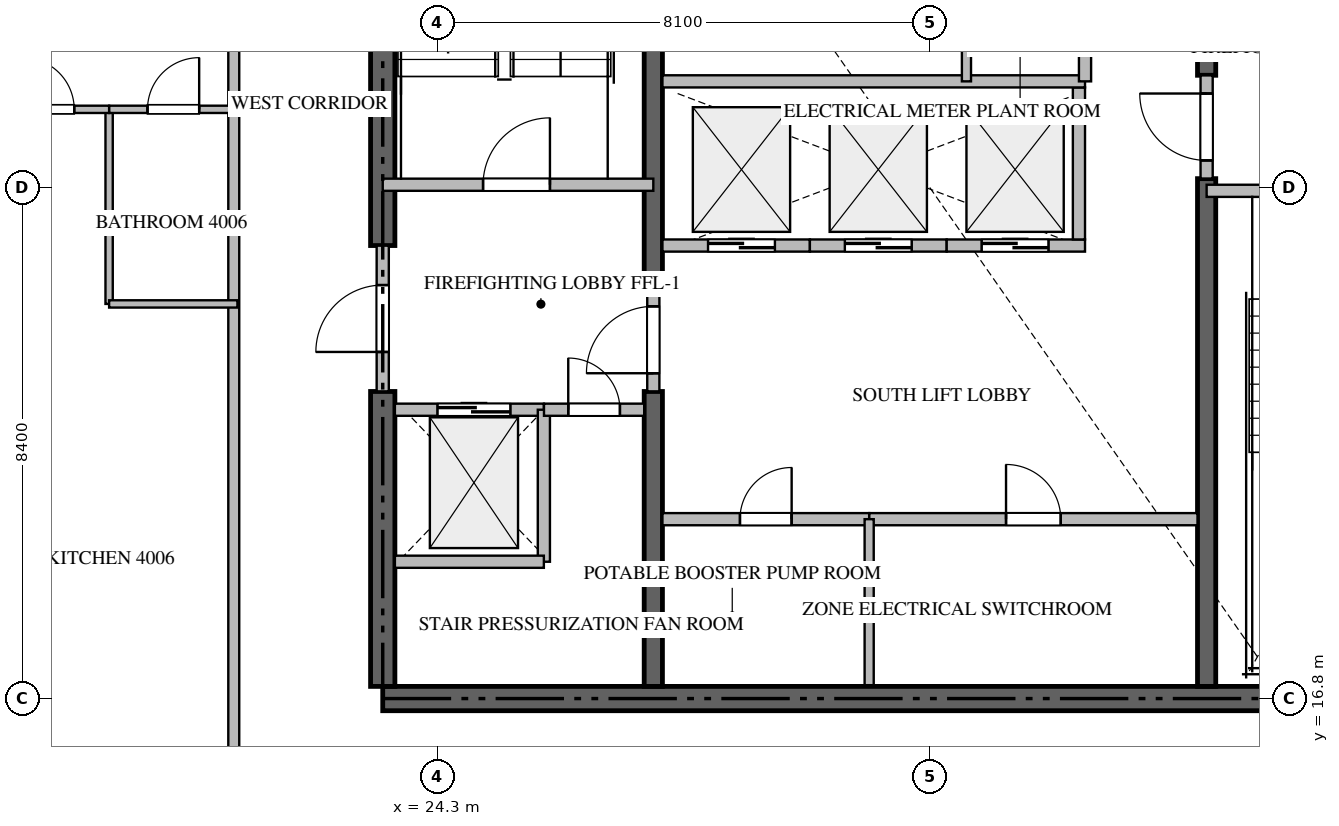
"""IFC4 building model, lengths in metres.
Left out: names, types, materials, properties, quantities, classifications, styles, units other than length and angle.
Written with IfcOpenShell. Run it as: python <this file> out.ifc"""

import sys

from ifc_helpers import new_model, si_unit, direction, frame, frame_2d, origin, place, context, subcontext, project, spatial, rectangle, extrude, source, transform, mapped, element, fill, save


model = new_model("IFC4")
c1 = context("Model", 3, precision=1e-05, world=origin(), true_north=direction((0.0, 1.0)))
c2 = subcontext(c1, "Body", "Model", "MODEL_VIEW")
j1 = project(units=[si_unit("LENGTHUNIT", "METRE"), si_unit("PLANEANGLEUNIT", "RADIAN")], contexts=[c1])
p1 = place(None, origin())
s1 = spatial("IfcSite", under=j1, at=p1, CompositionType="ELEMENT")
p2 = place(p1, origin())
s2 = spatial("IfcBuilding", under=s1, at=p2, CompositionType="ELEMENT")
p3 = place(p2, frame((0.0, 0.0, 161.4)))
s3 = spatial("IfcBuildingStorey", under=s2, at=p3, CompositionType="ELEMENT", Elevation=161.4)
p4 = place(p3, frame((23.4, 16.8, -0.26), z_axis=(0.0, 0.0, 1.0), x_axis=(1.0, 0.0, 0.0)))
e1 = element("IfcWall", 1, at=p4, inside=s3, PredefinedType="SHEAR", context=c2, shape_type="SweptSolid", body=[
    extrude(rectangle(XDim=18.0, YDim=0.4, at=frame_2d((9.0, 0.0))), origin(), (0.0, 0.0, 1.0), 3.748),
])
p5 = place(p3, frame((23.4, 17.0, -0.26), z_axis=(0.0, 0.0, 1.0), x_axis=(0.0, 1.0, 0.0)))
e2 = element("IfcWall", 2, at=p5, inside=s3, PredefinedType="SHEAR", context=c2, shape_type="SweptSolid", body=[
    extrude(rectangle(XDim=4.85, YDim=0.4, at=frame_2d((2.425, 0.0))), origin(), (0.0, 0.0, 1.0), 3.748),
])
p6 = place(p3, frame((23.4, 24.25, -0.26), z_axis=(0.0, 0.0, 1.0), x_axis=(0.0, 1.0, 0.0)))
e3 = element("IfcWall", 3, at=p6, inside=s3, PredefinedType="SHEAR", context=c2, shape_type="SweptSolid", body=[
    extrude(rectangle(XDim=9.15, YDim=0.4, at=frame_2d((4.575, 0.0))), origin(), (0.0, 0.0, 1.0), 3.748),
])
p7 = place(p3, frame((27.85, 17.0, -0.26), z_axis=(0.0, 0.0, 1.0), x_axis=(0.0, 1.0, 0.0)))
e4 = element("IfcWall", 4, at=p7, inside=s3, PredefinedType="SHEAR", context=c2, shape_type="SweptSolid", body=[
    extrude(rectangle(XDim=4.85, YDim=0.3, at=frame_2d((2.425, 0.0))), origin(), (0.0, 0.0, 1.0), 3.748),
])
p8 = place(p3, frame((27.85, 23.55, -0.26), z_axis=(0.0, 0.0, 1.0), x_axis=(0.0, 1.0, 0.0)))
e5 = element("IfcWall", 5, at=p8, inside=s3, PredefinedType="SHEAR", context=c2, shape_type="SweptSolid", body=[
    extrude(rectangle(XDim=9.85, YDim=0.3, at=frame_2d((4.925, 0.0))), origin(), (0.0, 0.0, 1.0), 3.748),
])
p9 = place(p3, frame((36.95, 17.0, -0.26), z_axis=(0.0, 0.0, 1.0), x_axis=(0.0, 1.0, 0.0)))
e6 = element("IfcWall", 6, at=p9, inside=s3, PredefinedType="SHEAR", context=c2, shape_type="SweptSolid", body=[
    extrude(rectangle(XDim=8.35, YDim=0.3, at=frame_2d((4.175, 0.0))), origin(), (0.0, 0.0, 1.0), 3.748),
])
p10 = place(p3, frame((36.95, 27.05, -0.26), z_axis=(0.0, 0.0, 1.0), x_axis=(0.0, 1.0, 0.0)))
e7 = element("IfcWall", 7, at=p10, inside=s3, PredefinedType="SHEAR", context=c2, shape_type="SweptSolid", body=[
    extrude(rectangle(XDim=6.35, YDim=0.3, at=frame_2d((3.175, 0.0))), origin(), (0.0, 0.0, 1.0), 3.748),
])
p11 = place(p3, frame((23.4, 25.25, 0.0), z_axis=(0.0, 0.0, 1.0), x_axis=(1.0, 0.0, 0.0)))
e8 = element("IfcWall", 8, at=p11, inside=s3, PredefinedType="STANDARD", context=c2, shape_type="SweptSolid", body=[
    extrude(rectangle(XDim=4.45, YDim=0.2, at=frame_2d((2.225, 0.0))), origin(), (0.0, 0.0, 1.0), 3.49),
])
p12 = place(p11, frame((1.65, 0.0, 0.0)))
e9 = element("IfcOpeningElement", 9, at=p12, cuts=e8, PredefinedType="OPENING", context=c2, shape_type="SweptSolid", body=[
    extrude(rectangle(XDim=1.1, YDim=2.15, at=frame_2d((0.55, 1.075))), frame((0.0, 0.11, 0.0), z_axis=(0.0, -1.0, 0.0), x_axis=(1.0, 0.0, 0.0)), (0.0, 0.0, 1.0), 0.22),
])
p13 = place(p3, frame((36.95, 25.15, 0.0), z_axis=(0.0, 0.0, 1.0), x_axis=(1.0, 0.0, 0.0)))
e10 = element("IfcWall", 10, at=p13, inside=s3, PredefinedType="STANDARD", context=c2, shape_type="SweptSolid", body=[
    extrude(rectangle(XDim=4.45, YDim=0.2, at=frame_2d((2.225, 0.0))), origin(), (0.0, 0.0, 1.0), 3.49),
])
p14 = place(p13, frame((1.65, 0.0, 0.0)))
e11 = element("IfcOpeningElement", 11, at=p14, cuts=e10, PredefinedType="OPENING", context=c2, shape_type="SweptSolid", body=[
    extrude(rectangle(XDim=1.1, YDim=2.15, at=frame_2d((0.55, 1.075))), frame((0.0, 0.11, 0.0), z_axis=(0.0, -1.0, 0.0), x_axis=(1.0, 0.0, 0.0)), (0.0, 0.0, 1.0), 0.22),
])
p15 = place(p3, frame((23.6, 21.55, 0.0), z_axis=(0.0, 0.0, 1.0), x_axis=(1.0, 0.0, 0.0)))
e12 = element("IfcWall", 12, at=p15, inside=s3, PredefinedType="STANDARD", context=c2, shape_type="SweptSolid", body=[
    extrude(rectangle(XDim=2.45, YDim=0.2, at=frame_2d((1.225, 0.0))), origin(), (0.0, 0.0, 1.0), 3.49),
])
p16 = place(p15, frame((0.7, 0.0, 0.0)))
e13 = element("IfcOpeningElement", 13, at=p16, cuts=e12, PredefinedType="OPENING", context=c2, shape_type="SweptSolid", body=[
    extrude(rectangle(XDim=1.2, YDim=2.2, at=frame_2d((0.6, 1.1))), frame((0.0, 0.11, 0.0), z_axis=(0.0, -1.0, 0.0), x_axis=(1.0, 0.0, 0.0)), (0.0, 0.0, 1.0), 0.22),
])
p17 = place(p3, frame((28.0, 24.25, 0.0), z_axis=(0.0, 0.0, 1.0), x_axis=(1.0, 0.0, 0.0)))
e14 = element("IfcWall", 14, at=p17, inside=s3, PredefinedType="STANDARD", context=c2, shape_type="SweptSolid", body=[
    extrude(rectangle(XDim=2.425, YDim=0.2, at=frame_2d((1.212, 0.0))), origin(), (0.0, 0.0, 1.0), 3.49),
])
p18 = place(p17, frame((0.75, 0.0, 0.0)))
e15 = element("IfcOpeningElement", 15, at=p18, cuts=e14, PredefinedType="OPENING", context=c2, shape_type="SweptSolid", body=[
    extrude(rectangle(XDim=1.1, YDim=2.2, at=frame_2d((0.55, 1.1))), frame((0.0, 0.11, 0.0), z_axis=(0.0, -1.0, 0.0), x_axis=(1.0, 0.0, 0.0)), (0.0, 0.0, 1.0), 0.22),
])
p19 = place(p3, frame((30.425, 24.25, 0.0), z_axis=(0.0, 0.0, 1.0), x_axis=(1.0, 0.0, 0.0)))
e16 = element("IfcWall", 16, at=p19, inside=s3, PredefinedType="STANDARD", context=c2, shape_type="SweptSolid", body=[
    extrude(rectangle(XDim=2.25, YDim=0.2, at=frame_2d((1.125, 0.0))), origin(), (0.0, 0.0, 1.0), 3.49),
])
p20 = place(p19, frame((0.575, 0.0, 0.0)))
e17 = element("IfcOpeningElement", 17, at=p20, cuts=e16, PredefinedType="OPENING", context=c2, shape_type="SweptSolid", body=[
    extrude(rectangle(XDim=1.1, YDim=2.2, at=frame_2d((0.55, 1.1))), frame((0.0, 0.11, 0.0), z_axis=(0.0, -1.0, 0.0), x_axis=(1.0, 0.0, 0.0)), (0.0, 0.0, 1.0), 0.22),
])
p21 = place(p3, frame((32.675, 24.25, 0.0), z_axis=(0.0, 0.0, 1.0), x_axis=(1.0, 0.0, 0.0)))
e18 = element("IfcWall", 18, at=p21, inside=s3, PredefinedType="STANDARD", context=c2, shape_type="SweptSolid", body=[
    extrude(rectangle(XDim=2.275, YDim=0.2, at=frame_2d((1.137, 0.0))), origin(), (0.0, 0.0, 1.0), 3.49),
])
p22 = place(p21, frame((0.575, 0.0, 0.0)))
e19 = element("IfcOpeningElement", 19, at=p22, cuts=e18, PredefinedType="OPENING", context=c2, shape_type="SweptSolid", body=[
    extrude(rectangle(XDim=1.1, YDim=2.2, at=frame_2d((0.55, 1.1))), frame((0.0, 0.11, 0.0), z_axis=(0.0, -1.0, 0.0), x_axis=(1.0, 0.0, 0.0)), (0.0, 0.0, 1.0), 0.22),
])
for number, where, z_axis, x_axis in (
    (20, (34.85, 24.35, 0.0), (0.0, 0.0, 1.0), (0.0, 1.0, 0.0)),
    (21, (26.05, 19.05, 0.0), (0.0, 0.0, 1.0), (0.0, 1.0, 0.0)),
):
    element("IfcWall", number, at=place(p3, frame(where, z_axis=z_axis, x_axis=x_axis)), inside=s3, PredefinedType="STANDARD", context=c2, shape_type="SweptSolid", body=[
        extrude(rectangle(XDim=2.5, YDim=0.2, at=frame_2d((1.25, 0.0))), origin(), (0.0, 0.0, 1.0), 3.49),
    ])
p23 = place(p3, frame((23.6, 19.05, 0.0), z_axis=(0.0, 0.0, 1.0), x_axis=(1.0, 0.0, 0.0)))
e22 = element("IfcWall", 22, at=p23, inside=s3, PredefinedType="STANDARD", context=c2, shape_type="SweptSolid", body=[
    extrude(rectangle(XDim=2.45, YDim=0.2, at=frame_2d((1.225, 0.0))), origin(), (0.0, 0.0, 1.0), 3.49),
])
p24 = place(p3, frame((26.052, 21.55, 0.0), z_axis=(0.0, 0.0, 1.0), x_axis=(1.0, 0.0, 0.0)))
e23 = element("IfcWall", 23, at=p24, inside=s3, PredefinedType="STANDARD", context=c2, shape_type="SweptSolid", body=[
    extrude(rectangle(XDim=1.648, YDim=0.2, at=frame_2d((0.824, 0.0))), origin(), (0.0, 0.0, 1.0), 3.49),
])
p25 = place(p24, frame((0.399, 0.0, 0.0)))
e24 = element("IfcOpeningElement", 24, at=p25, cuts=e23, PredefinedType="OPENING", context=c2, shape_type="SweptSolid", body=[
    extrude(rectangle(XDim=0.85, YDim=2.1, at=frame_2d((0.425, 1.05))), frame((0.0, 0.11, 0.0), z_axis=(0.0, -1.0, 0.0), x_axis=(1.0, 0.0, 0.0)), (0.0, 0.0, 1.0), 0.22),
])
p26 = place(p3, frame((23.4, 21.852, 0.0), z_axis=(0.0, 0.0, 1.0), x_axis=(0.0, 1.0, 0.0)))
e25 = element("IfcWall", 25, at=p26, inside=s3, PredefinedType="STANDARD", context=c2, shape_type="SweptSolid", body=[
    extrude(rectangle(XDim=2.396, YDim=0.2, at=frame_2d((1.198, 0.0))), origin(), (0.0, 0.0, 1.0), 3.49),
])
p27 = place(p26, frame((0.648, 0.0, 0.0)))
e26 = element("IfcOpeningElement", 26, at=p27, cuts=e25, PredefinedType="OPENING", context=c2, shape_type="SweptSolid", body=[
    extrude(rectangle(XDim=1.1, YDim=2.15, at=frame_2d((0.55, 1.075))), frame((0.0, 0.11, 0.0), z_axis=(0.0, -1.0, 0.0), x_axis=(1.0, 0.0, 0.0)), (0.0, 0.0, 1.0), 0.22),
])
p28 = place(p3, frame((27.85, 21.852, 0.0), z_axis=(0.0, 0.0, 1.0), x_axis=(0.0, 1.0, 0.0)))
e27 = element("IfcWall", 27, at=p28, inside=s3, PredefinedType="STANDARD", context=c2, shape_type="SweptSolid", body=[
    extrude(rectangle(XDim=1.696, YDim=0.2, at=frame_2d((0.848, 0.0))), origin(), (0.0, 0.0, 1.0), 3.49),
])
p29 = place(p28, frame((0.298, 0.0, 0.0)))
e28 = element("IfcOpeningElement", 28, at=p29, cuts=e27, PredefinedType="OPENING", context=c2, shape_type="SweptSolid", body=[
    extrude(rectangle(XDim=1.1, YDim=2.15, at=frame_2d((0.55, 1.075))), frame((0.0, 0.11, 0.0), z_axis=(0.0, -1.0, 0.0), x_axis=(1.0, 0.0, 0.0)), (0.0, 0.0, 1.0), 0.22),
])
p30 = place(p3, frame((36.95, 25.352, 0.0), z_axis=(0.0, 0.0, 1.0), x_axis=(0.0, 1.0, 0.0)))
e29 = element("IfcWall", 29, at=p30, inside=s3, PredefinedType="STANDARD", context=c2, shape_type="SweptSolid", body=[
    extrude(rectangle(XDim=1.696, YDim=0.2, at=frame_2d((0.848, 0.0))), origin(), (0.0, 0.0, 1.0), 3.49),
])
p31 = place(p30, frame((0.298, 0.0, 0.0)))
e30 = element("IfcOpeningElement", 30, at=p31, cuts=e29, PredefinedType="OPENING", context=c2, shape_type="SweptSolid", body=[
    extrude(rectangle(XDim=1.1, YDim=2.15, at=frame_2d((0.55, 1.075))), frame((0.0, 0.11, 0.0), z_axis=(0.0, -1.0, 0.0), x_axis=(1.0, 0.0, 0.0)), (0.0, 0.0, 1.0), 0.22),
])
p32 = place(p3, frame((28.0, 26.95, 0.0), z_axis=(0.0, 0.0, 1.0), x_axis=(1.0, 0.0, 0.0)))
e31 = element("IfcWall", 31, at=p32, inside=s3, PredefinedType="STANDARD", context=c2, shape_type="SweptSolid", body=[
    extrude(rectangle(XDim=6.95, YDim=0.2, at=frame_2d((3.475, 0.0))), origin(), (0.0, 0.0, 1.0), 3.49),
])
p33 = place(p3, frame((34.95, 26.95, 0.0), z_axis=(0.0, 0.0, 1.0), x_axis=(0.0, 1.0, 0.0)))
e32 = element("IfcWall", 32, at=p33, inside=s3, PredefinedType="STANDARD", context=c2, shape_type="SweptSolid", body=[
    extrude(rectangle(XDim=3.6, YDim=0.2, at=frame_2d((1.8, 0.0))), origin(), (0.0, 0.0, 1.0), 3.49),
])
p34 = place(p33, frame((1.35, 0.0, 0.0)))
e33 = element("IfcOpeningElement", 33, at=p34, cuts=e32, PredefinedType="OPENING", context=c2, shape_type="SweptSolid", body=[
    extrude(rectangle(XDim=0.9, YDim=2.1, at=frame_2d((0.45, 1.05))), frame((0.0, 0.11, 0.0), z_axis=(0.0, -1.0, 0.0), x_axis=(1.0, 0.0, 0.0)), (0.0, 0.0, 1.0), 0.22),
])
p35 = place(p3, frame((33.0, 26.95, 0.0), z_axis=(0.0, 0.0, 1.0), x_axis=(0.0, 1.0, 0.0)))
e34 = element("IfcWall", 34, at=p35, inside=s3, PredefinedType="PARTITIONING", context=c2, shape_type="SweptSolid", body=[
    extrude(rectangle(XDim=3.6, YDim=0.15, at=frame_2d((1.8, 0.0))), origin(), (0.0, 0.0, 1.0), 3.49),
])
p36 = place(p35, frame((1.375, 0.0, 0.0)))
e35 = element("IfcOpeningElement", 35, at=p36, cuts=e34, PredefinedType="OPENING", context=c2, shape_type="SweptSolid", body=[
    extrude(rectangle(XDim=0.85, YDim=2.1, at=frame_2d((0.425, 1.05))), frame((0.0, 0.085, 0.0), z_axis=(0.0, -1.0, 0.0), x_axis=(1.0, 0.0, 0.0)), (0.0, 0.0, 1.0), 0.17),
])
p37 = place(p3, frame((28.0, 19.75, 0.0), z_axis=(0.0, 0.0, 1.0), x_axis=(1.0, 0.0, 0.0)))
e36 = element("IfcWall", 36, at=p37, inside=s3, PredefinedType="STANDARD", context=c2, shape_type="SweptSolid", body=[
    extrude(rectangle(XDim=3.4, YDim=0.2, at=frame_2d((1.7, 0.0))), origin(), (0.0, 0.0, 1.0), 3.49),
])
p38 = place(p37, frame((1.275, 0.0, 0.0)))
e37 = element("IfcOpeningElement", 37, at=p38, cuts=e36, PredefinedType="OPENING", context=c2, shape_type="SweptSolid", body=[
    extrude(rectangle(XDim=0.85, YDim=2.1, at=frame_2d((0.425, 1.05))), frame((0.0, 0.11, 0.0), z_axis=(0.0, -1.0, 0.0), x_axis=(1.0, 0.0, 0.0)), (0.0, 0.0, 1.0), 0.22),
])
p39 = place(p3, frame((31.402, 19.75, 0.0), z_axis=(0.0, 0.0, 1.0), x_axis=(1.0, 0.0, 0.0)))
e38 = element("IfcWall", 38, at=p39, inside=s3, PredefinedType="STANDARD", context=c2, shape_type="SweptSolid", body=[
    extrude(rectangle(XDim=5.398, YDim=0.2, at=frame_2d((2.699, 0.0))), origin(), (0.0, 0.0, 1.0), 3.49),
])
p40 = place(p39, frame((2.249, 0.0, 0.0)))
e39 = element("IfcOpeningElement", 39, at=p40, cuts=e38, PredefinedType="OPENING", context=c2, shape_type="SweptSolid", body=[
    extrude(rectangle(XDim=0.9, YDim=2.1, at=frame_2d((0.45, 1.05))), frame((0.0, 0.11, 0.0), z_axis=(0.0, -1.0, 0.0), x_axis=(1.0, 0.0, 0.0)), (0.0, 0.0, 1.0), 0.22),
])
p41 = place(p3, frame((31.4, 17.02, 0.0), z_axis=(0.0, 0.0, 1.0), x_axis=(0.0, 1.0, 0.0)))
e40 = element("IfcWall", 40, at=p41, inside=s3, PredefinedType="PARTITIONING", context=c2, shape_type="SweptSolid", body=[
    extrude(rectangle(XDim=2.73, YDim=0.15, at=frame_2d((1.365, 0.0))), origin(), (0.0, 0.0, 1.0), 3.49),
])
p42 = place(p3, frame((20.95, 14.9, 0.0), z_axis=(0.0, 0.0, 1.0), x_axis=(0.0, 1.0, 0.0)))
e41 = element("IfcWall", 41, at=p42, inside=s3, PredefinedType="PARTITIONING", context=c2, shape_type="SweptSolid", body=[
    extrude(rectangle(XDim=18.7, YDim=0.18, at=frame_2d((9.35, 0.0))), origin(), (0.0, 0.0, 1.0), 3.49),
])
p43 = place(p42, frame((14.603, 0.0, 0.0)))
e42 = element("IfcOpeningElement", 42, at=p43, cuts=e41, PredefinedType="OPENING", context=c2, shape_type="SweptSolid", body=[
    extrude(rectangle(XDim=1.0, YDim=2.15, at=frame_2d((0.5, 1.075))), frame((0.0, 0.1, 0.0), z_axis=(0.0, -1.0, 0.0), x_axis=(1.0, 0.0, 0.0)), (0.0, 0.0, 1.0), 0.2),
])
p44 = place(p3, frame((18.9, 23.29, 0.0), z_axis=(0.0, 0.0, 1.0), x_axis=(0.0, 1.0, 0.0)))
e43 = element("IfcWall", 43, at=p44, inside=s3, PredefinedType="PARTITIONING", context=c2, shape_type="SweptSolid", body=[
    extrude(rectangle(XDim=3.2, YDim=0.12, at=frame_2d((1.6, 0.0))), origin(), (0.0, 0.0, 1.0), 3.49),
])
p45 = place(p3, frame((18.9, 23.29, 0.0), z_axis=(0.0, 0.0, 1.0), x_axis=(1.0, 0.0, 0.0)))
e44 = element("IfcWall", 44, at=p45, inside=s3, PredefinedType="PARTITIONING", context=c2, shape_type="SweptSolid", body=[
    extrude(rectangle(XDim=2.11, YDim=0.12, at=frame_2d((1.055, 0.0))), origin(), (0.0, 0.0, 1.0), 3.49),
])
p46 = place(p3, frame((16.902, 26.49, 0.0), z_axis=(0.0, 0.0, 1.0), x_axis=(1.0, 0.0, 0.0)))
e45 = element("IfcWall", 45, at=p46, inside=s3, PredefinedType="PARTITIONING", context=c2, shape_type="SweptSolid", body=[
    extrude(rectangle(XDim=1.998, YDim=0.12, at=frame_2d((0.999, 0.0))), origin(), (0.0, 0.0, 1.0), 3.49),
])
p47 = place(p46, frame((0.574, 0.0, 0.0)))
e46 = element("IfcOpeningElement", 46, at=p47, cuts=e45, PredefinedType="OPENING", context=c2, shape_type="SweptSolid", body=[
    extrude(rectangle(XDim=0.85, YDim=2.1, at=frame_2d((0.425, 1.05))), frame((0.0, 0.07, 0.0), z_axis=(0.0, -1.0, 0.0), x_axis=(1.0, 0.0, 0.0)), (0.0, 0.0, 1.0), 0.14),
])
p48 = place(p3, frame((18.902, 26.49, 0.0), z_axis=(0.0, 0.0, 1.0), x_axis=(1.0, 0.0, 0.0)))
e47 = element("IfcWall", 47, at=p48, inside=s3, PredefinedType="PARTITIONING", context=c2, shape_type="SweptSolid", body=[
    extrude(rectangle(XDim=2.108, YDim=0.12, at=frame_2d((1.054, 0.0))), origin(), (0.0, 0.0, 1.0), 3.49),
])
p49 = place(p48, frame((0.629, 0.0, 0.0)))
e48 = element("IfcOpeningElement", 48, at=p49, cuts=e47, PredefinedType="OPENING", context=c2, shape_type="SweptSolid", body=[
    extrude(rectangle(XDim=0.85, YDim=2.1, at=frame_2d((0.425, 1.05))), frame((0.0, 0.07, 0.0), z_axis=(0.0, -1.0, 0.0), x_axis=(1.0, 0.0, 0.0)), (0.0, 0.0, 1.0), 0.14),
])
m1 = source(origin(), c2, "Body", "SweptSolid", [
    extrude(rectangle(XDim=1.1, YDim=2.15, at=frame_2d((0.55, 1.075))), frame((0.0, 0.025, 0.0), z_axis=(0.0, -1.0, 0.0), x_axis=(1.0, 0.0, 0.0)), (0.0, 0.0, 1.0), 0.05),
])
p50 = place(p12, origin())
e49 = element("IfcDoor", 49, at=p50, inside=s3, OperationType="SINGLE_SWING_RIGHT", PredefinedType="DOOR", context=c2, shape_type="MappedRepresentation", body=[
    mapped(m1, transform((0.0, 0.0, 0.0), scale=1.0)),
])
fill(e9, e49)
m2 = source(origin(), c2, "Body", "SweptSolid", [
    extrude(rectangle(XDim=1.2, YDim=2.2, at=frame_2d((0.6, 1.1))), frame((0.0, 0.025, 0.0), z_axis=(0.0, -1.0, 0.0), x_axis=(1.0, 0.0, 0.0)), (0.0, 0.0, 1.0), 0.05),
])
p51 = place(p16, origin())
e50 = element("IfcDoor", 50, at=p51, inside=s3, OperationType="DOUBLE_DOOR_SLIDING", PredefinedType="DOOR", context=c2, shape_type="MappedRepresentation", body=[
    mapped(m2, transform((0.0, 0.0, 0.0), scale=1.0)),
])
fill(e13, e50)
m3 = source(origin(), c2, "Body", "SweptSolid", [
    extrude(rectangle(XDim=1.1, YDim=2.2, at=frame_2d((0.55, 1.1))), frame((0.0, 0.025, 0.0), z_axis=(0.0, -1.0, 0.0), x_axis=(1.0, 0.0, 0.0)), (0.0, 0.0, 1.0), 0.05),
])
p52 = place(p18, origin())
e51 = element("IfcDoor", 51, at=p52, inside=s3, OperationType="DOUBLE_DOOR_SLIDING", PredefinedType="DOOR", context=c2, shape_type="MappedRepresentation", body=[
    mapped(m3, transform((0.0, 0.0, 0.0), scale=1.0)),
])
fill(e15, e51)
p53 = place(p20, origin())
e52 = element("IfcDoor", 52, at=p53, inside=s3, OperationType="DOUBLE_DOOR_SLIDING", PredefinedType="DOOR", context=c2, shape_type="MappedRepresentation", body=[
    mapped(m3, transform((0.0, 0.0, 0.0), scale=1.0)),
])
fill(e17, e52)
p54 = place(p22, origin())
e53 = element("IfcDoor", 53, at=p54, inside=s3, OperationType="DOUBLE_DOOR_SLIDING", PredefinedType="DOOR", context=c2, shape_type="MappedRepresentation", body=[
    mapped(m3, transform((0.0, 0.0, 0.0), scale=1.0)),
])
fill(e19, e53)
m4 = source(origin(), c2, "Body", "SweptSolid", [
    extrude(rectangle(XDim=0.85, YDim=2.1, at=frame_2d((0.425, 1.05))), frame((0.0, 0.025, 0.0), z_axis=(0.0, -1.0, 0.0), x_axis=(1.0, 0.0, 0.0)), (0.0, 0.0, 1.0), 0.05),
])
p55 = place(p25, origin())
e54 = element("IfcDoor", 54, at=p55, inside=s3, OperationType="SINGLE_SWING_LEFT", PredefinedType="DOOR", context=c2, shape_type="MappedRepresentation", body=[
    mapped(m4, transform((0.0, 0.0, 0.0), scale=1.0)),
])
fill(e24, e54)
p56 = place(p27, origin())
e55 = element("IfcDoor", 55, at=p56, inside=s3, OperationType="SINGLE_SWING_LEFT", PredefinedType="DOOR", context=c2, shape_type="MappedRepresentation", body=[
    mapped(m1, transform((0.0, 0.0, 0.0), scale=1.0)),
])
fill(e26, e55)
p57 = place(p29, origin())
e56 = element("IfcDoor", 56, at=p57, inside=s3, OperationType="SINGLE_SWING_LEFT", PredefinedType="DOOR", context=c2, shape_type="MappedRepresentation", body=[
    mapped(m1, transform((0.0, 0.0, 0.0), scale=1.0)),
])
fill(e28, e56)
p58 = place(p31, origin())
e57 = element("IfcDoor", 57, at=p58, inside=s3, OperationType="SINGLE_SWING_RIGHT", PredefinedType="DOOR", context=c2, shape_type="MappedRepresentation", body=[
    mapped(m1, transform((0.0, 0.0, 0.0), scale=1.0)),
])
fill(e30, e57)
p59 = place(p38, origin())
e58 = element("IfcDoor", 58, at=p59, inside=s3, OperationType="SINGLE_SWING_RIGHT", PredefinedType="DOOR", context=c2, shape_type="MappedRepresentation", body=[
    mapped(m4, transform((0.0, 0.0, 0.0), scale=1.0)),
])
fill(e37, e58)
m5 = source(origin(), c2, "Body", "SweptSolid", [
    extrude(rectangle(XDim=0.9, YDim=2.1, at=frame_2d((0.45, 1.05))), frame((0.0, 0.025, 0.0), z_axis=(0.0, -1.0, 0.0), x_axis=(1.0, 0.0, 0.0)), (0.0, 0.0, 1.0), 0.05),
])
p60 = place(p40, origin())
e59 = element("IfcDoor", 59, at=p60, inside=s3, OperationType="SINGLE_SWING_LEFT", PredefinedType="DOOR", context=c2, shape_type="MappedRepresentation", body=[
    mapped(m5, transform((0.0, 0.0, 0.0), scale=1.0)),
])
fill(e39, e59)
p61 = place(p47, origin())
e60 = element("IfcDoor", 60, at=p61, inside=s3, OperationType="SINGLE_SWING_LEFT", PredefinedType="DOOR", context=c2, shape_type="MappedRepresentation", body=[
    mapped(m4, transform((0.0, 0.0, 0.0), scale=1.0)),
])
fill(e46, e60)
p62 = place(p49, origin())
e61 = element("IfcDoor", 61, at=p62, inside=s3, OperationType="SINGLE_SWING_RIGHT", PredefinedType="DOOR", context=c2, shape_type="MappedRepresentation", body=[
    mapped(m4, transform((0.0, 0.0, 0.0), scale=1.0)),
])
fill(e48, e61)
save(model, sys.argv[1])
